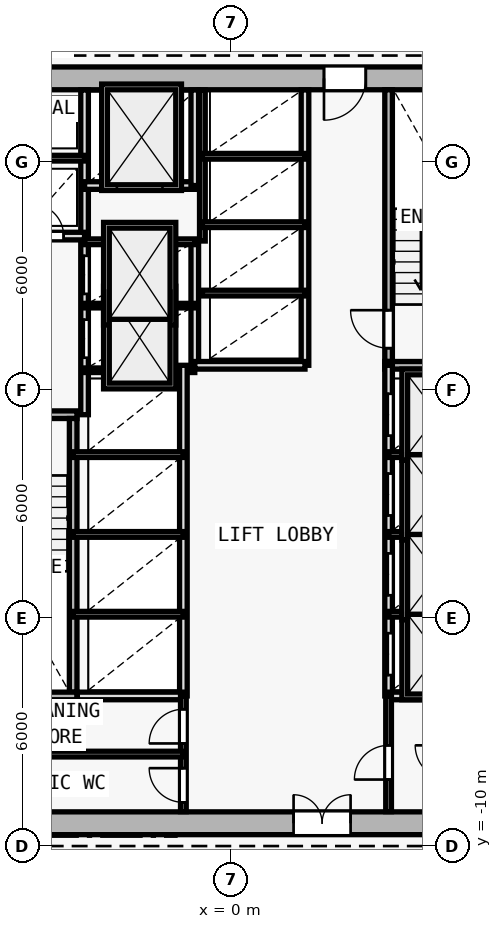
"""IFC4 building model, lengths in metres.
Left out: names, types, materials, properties, quantities, classifications, styles, units other than length and angle.
Written with IfcOpenShell. Run it as: python <this file> out.ifc"""

import sys

from ifc_helpers import new_model, si_unit, direction, frame, frame_2d, origin, origin_2d, place, context, subcontext, project, spatial, rectangle, i_section, extrude, element, fill, save


model = new_model("IFC4")
c1 = context("Model", 3, precision=1e-05, world=origin(), true_north=direction((0.0, 1.0)))
c2 = subcontext(c1, "Body", "Model", "MODEL_VIEW")
j1 = project(units=[si_unit("LENGTHUNIT", "METRE"), si_unit("PLANEANGLEUNIT", "RADIAN")], contexts=[c1])
p1 = place(None, origin())
s1 = spatial("IfcSite", under=j1, at=p1, CompositionType="ELEMENT")
p2 = place(p1, origin())
s2 = spatial("IfcBuilding", under=s1, at=p2, CompositionType="ELEMENT")
p3 = place(p2, frame((0.0, 0.0, 66.0)))
s3 = spatial("IfcBuildingStorey", under=s2, at=p3, CompositionType="ELEMENT", Elevation=66.0)
p4 = place(p3, frame((0.0, -9.4, 0.0), z_axis=(0.0, 0.0, 1.0), x_axis=(1.0, 0.0, 0.0)))
e1 = element("IfcColumn", 1, at=p4, inside=s3, PredefinedType="COLUMN", context=c2, shape_type="SweptSolid", body=[
    extrude(i_section(OverallWidth=0.416, OverallDepth=0.446, WebThickness=0.025, FlangeThickness=0.04, FilletRadius=0.015, at=origin_2d()), origin(), (0.0, 0.0, 1.0), 3.6),
])
p5 = place(p3, frame((-8.0, -9.4, 0.0), z_axis=(0.0, 0.0, 1.0), x_axis=(1.0, 0.0, 0.0)))
e2 = element("IfcWall", 2, at=p5, inside=s3, PredefinedType="SHEAR", context=c2, shape_type="SweptSolid", body=[
    extrude(rectangle(XDim=16.0, YDim=0.6, at=frame_2d((8.0, 0.0))), origin(), (0.0, 0.0, 1.0), 3.35),
])
p6 = place(p5, frame((9.65, 0.0, 0.0)))
e3 = element("IfcOpeningElement", 3, at=p6, cuts=e2, PredefinedType="OPENING", context=c2, shape_type="SweptSolid", body=[
    extrude(rectangle(XDim=1.5, YDim=2.2, at=frame_2d((0.75, 1.1))), frame((0.0, 0.31, 0.0), z_axis=(0.0, -1.0, 0.0), x_axis=(1.0, 0.0, 0.0)), (0.0, 0.0, 1.0), 0.62),
])
p7 = place(p3, frame((8.0, 10.2, 0.0), z_axis=(0.0, 0.0, 1.0), x_axis=(-1.0, 0.0, 0.0)))
e4 = element("IfcWall", 4, at=p7, inside=s3, PredefinedType="SHEAR", context=c2, shape_type="SweptSolid", body=[
    extrude(rectangle(XDim=16.0, YDim=0.6, at=frame_2d((8.0, 0.0))), origin(), (0.0, 0.0, 1.0), 3.35),
])
p8 = place(p7, frame((4.45, 0.0, 0.0)))
e5 = element("IfcOpeningElement", 5, at=p8, cuts=e4, PredefinedType="OPENING", context=c2, shape_type="SweptSolid", body=[
    extrude(rectangle(XDim=1.1, YDim=2.15, at=frame_2d((0.55, 1.075))), frame((0.0, 0.31, 0.0), z_axis=(0.0, -1.0, 0.0), x_axis=(1.0, 0.0, 0.0)), (0.0, 0.0, 1.0), 0.62),
])
p9 = place(p3, frame((-7.4, 1.35, 0.0), z_axis=(0.0, 0.0, 1.0), x_axis=(1.0, 0.0, 0.0)))
e6 = element("IfcWall", 6, at=p9, inside=s3, PredefinedType="SOLIDWALL", context=c2, shape_type="SweptSolid", body=[
    extrude(rectangle(XDim=3.35, YDim=0.2, at=frame_2d((1.675, 0.0))), origin(), (0.0, 0.0, 1.0), 3.35),
])
p10 = place(p9, frame((0.65, 0.0, 0.0)))
e7 = element("IfcOpeningElement", 7, at=p10, cuts=e6, PredefinedType="OPENING", context=c2, shape_type="SweptSolid", body=[
    extrude(rectangle(XDim=1.0, YDim=2.15, at=frame_2d((0.5, 1.075))), frame((0.0, 0.11, 0.0), z_axis=(0.0, -1.0, 0.0), x_axis=(1.0, 0.0, 0.0)), (0.0, 0.0, 1.0), 0.22),
])
p11 = place(p3, frame((-4.15, -5.95, 0.0), z_axis=(0.0, 0.0, 1.0), x_axis=(0.0, 1.0, 0.0)))
e8 = element("IfcWall", 8, at=p11, inside=s3, PredefinedType="SOLIDWALL", context=c2, shape_type="SweptSolid", body=[
    extrude(rectangle(XDim=7.2, YDim=0.2, at=frame_2d((3.6, 0.0))), origin(), (0.0, 0.0, 1.0), 3.35),
])
p12 = place(p3, frame((-3.85, 1.35, 0.0), z_axis=(0.0, 0.0, 1.0), x_axis=(0.0, 1.0, 0.0)))
e9 = element("IfcWall", 9, at=p12, inside=s3, PredefinedType="SOLIDWALL", context=c2, shape_type="SweptSolid", body=[
    extrude(rectangle(XDim=8.545, YDim=0.2, at=frame_2d((4.272, 0.0))), origin(), (0.0, 0.0, 1.0), 3.35),
])
p13 = place(p12, frame((1.5, 0.0, 0.0)))
e10 = element("IfcOpeningElement", 10, at=p13, cuts=e9, PredefinedType="OPENING", context=c2, shape_type="SweptSolid", body=[
    extrude(rectangle(XDim=1.0, YDim=2.15, at=frame_2d((0.5, 1.075))), frame((0.0, 0.11, 0.0), z_axis=(0.0, -1.0, 0.0), x_axis=(1.0, 0.0, 0.0)), (0.0, 0.0, 1.0), 0.22),
])
p14 = place(p12, frame((3.18, 0.0, 0.0)))
e11 = element("IfcOpeningElement", 11, at=p14, cuts=e9, PredefinedType="OPENING", context=c2, shape_type="SweptSolid", body=[
    extrude(rectangle(XDim=1.0, YDim=2.15, at=frame_2d((0.5, 1.075))), frame((0.0, 0.11, 0.0), z_axis=(0.0, -1.0, 0.0), x_axis=(1.0, 0.0, 0.0)), (0.0, 0.0, 1.0), 0.22),
])
p15 = place(p3, frame((-7.395, 6.05, 0.0), z_axis=(0.0, 0.0, 1.0), x_axis=(1.0, 0.0, 0.0)))
e12 = element("IfcWall", 12, at=p15, inside=s3, PredefinedType="SOLIDWALL", context=c2, shape_type="SweptSolid", body=[
    extrude(rectangle(XDim=3.545, YDim=0.2, at=frame_2d((1.772, 0.0))), origin(), (0.0, 0.0, 1.0), 3.35),
])
p16 = place(p15, frame((0.345, 0.0, 0.0)))
e13 = element("IfcOpeningElement", 13, at=p16, cuts=e12, PredefinedType="OPENING", context=c2, shape_type="SweptSolid", body=[
    extrude(rectangle(XDim=0.85, YDim=2.1, at=frame_2d((0.425, 1.05))), frame((0.0, 0.11, 0.0), z_axis=(0.0, -1.0, 0.0), x_axis=(1.0, 0.0, 0.0)), (0.0, 0.0, 1.0), 0.22),
])
p17 = place(p15, frame((2.145, 0.0, 0.0)))
e14 = element("IfcOpeningElement", 14, at=p17, cuts=e12, PredefinedType="OPENING", context=c2, shape_type="SweptSolid", body=[
    extrude(rectangle(XDim=0.85, YDim=2.1, at=frame_2d((0.425, 1.05))), frame((0.0, 0.11, 0.0), z_axis=(0.0, -1.0, 0.0), x_axis=(1.0, 0.0, 0.0)), (0.0, 0.0, 1.0), 0.22),
])
p18 = place(p3, frame((-7.395, 8.1, 0.0), z_axis=(0.0, 0.0, 1.0), x_axis=(1.0, 0.0, 0.0)))
e15 = element("IfcWall", 15, at=p18, inside=s3, PredefinedType="PARTITIONING", context=c2, shape_type="SweptSolid", body=[
    extrude(rectangle(XDim=3.545, YDim=0.15, at=frame_2d((1.772, 0.0))), origin(), (0.0, 0.0, 1.0), 3.35),
])
p19 = place(p3, frame((4.15, 2.75, 0.0), z_axis=(0.0, 0.0, 1.0), x_axis=(0.0, 1.0, 0.0)))
e16 = element("IfcWall", 16, at=p19, inside=s3, PredefinedType="SOLIDWALL", context=c2, shape_type="SweptSolid", body=[
    extrude(rectangle(XDim=7.15, YDim=0.2, at=frame_2d((3.575, 0.0))), origin(), (0.0, 0.0, 1.0), 3.35),
])
p20 = place(p19, frame((0.35, 0.0, 0.0)))
e17 = element("IfcOpeningElement", 17, at=p20, cuts=e16, PredefinedType="OPENING", context=c2, shape_type="SweptSolid", body=[
    extrude(rectangle(XDim=1.0, YDim=2.15, at=frame_2d((0.5, 1.075))), frame((0.0, 0.11, 0.0), z_axis=(0.0, -1.0, 0.0), x_axis=(1.0, 0.0, 0.0)), (0.0, 0.0, 1.0), 0.22),
])
p21 = place(p3, frame((4.05, 2.65, 0.0), z_axis=(0.0, 0.0, 1.0), x_axis=(1.0, 0.0, 0.0)))
e18 = element("IfcWall", 18, at=p21, inside=s3, PredefinedType="SOLIDWALL", context=c2, shape_type="SweptSolid", body=[
    extrude(rectangle(XDim=3.35, YDim=0.2, at=frame_2d((1.675, 0.0))), origin(), (0.0, 0.0, 1.0), 3.35),
])
p22 = place(p3, frame((-0.95, 2.65, 0.0), z_axis=(0.0, 0.0, 1.0), x_axis=(0.0, 1.0, 0.0)))
e19 = element("IfcWall", 19, at=p22, inside=s3, PredefinedType="SOLIDWALL", context=c2, shape_type="SweptSolid", body=[
    extrude(rectangle(XDim=3.27, YDim=0.2, at=frame_2d((1.635, 0.0))), origin(), (0.0, 0.0, 1.0), 3.35),
])
for number, where, z_axis, x_axis in (
    (20, (-3.85, 2.52, 0.0), (0.0, 0.0, 1.0), (1.0, 0.0, 0.0)),
    (21, (-3.85, 4.22, 0.0), (0.0, 0.0, 1.0), (1.0, 0.0, 0.0)),
):
    element("IfcWall", number, at=place(p3, frame(where, z_axis=z_axis, x_axis=x_axis)), inside=s3, PredefinedType="PARTITIONING", context=c2, shape_type="SweptSolid", body=[
        extrude(rectangle(XDim=2.9, YDim=0.12, at=frame_2d((1.45, 0.0))), origin(), (0.0, 0.0, 1.0), 3.35),
    ])
p23 = place(p3, frame((-3.85, 5.9, 0.0), z_axis=(0.0, 0.0, 1.0), x_axis=(1.0, 0.0, 0.0)))
e22 = element("IfcWall", 22, at=p23, inside=s3, PredefinedType="PARTITIONING", context=c2, shape_type="SweptSolid", body=[
    extrude(rectangle(XDim=2.9, YDim=0.15, at=frame_2d((1.45, 0.0))), origin(), (0.0, 0.0, 1.0), 3.35),
])
p24 = place(p3, frame((-3.85, 7.38, 0.0), z_axis=(0.0, 0.0, 1.0), x_axis=(1.0, 0.0, 0.0)))
e23 = element("IfcWall", 23, at=p24, inside=s3, PredefinedType="SOLIDWALL", context=c2, shape_type="SweptSolid", body=[
    extrude(rectangle(XDim=2.9, YDim=0.2, at=frame_2d((1.45, 0.0))), origin(), (0.0, 0.0, 1.0), 3.35),
])
p25 = place(p24, frame((0.85, 0.0, 0.0)))
e24 = element("IfcOpeningElement", 24, at=p25, cuts=e23, PredefinedType="OPENING", context=c2, shape_type="SweptSolid", body=[
    extrude(rectangle(XDim=1.2, YDim=2.2, at=frame_2d((0.6, 1.1))), frame((0.0, 0.11, 0.0), z_axis=(0.0, -1.0, 0.0), x_axis=(1.0, 0.0, 0.0)), (0.0, 0.0, 1.0), 0.22),
])
p26 = place(p3, frame((-0.95, 7.38, 0.0), z_axis=(0.0, 0.0, 1.0), x_axis=(0.0, 1.0, 0.0)))
e25 = element("IfcWall", 25, at=p26, inside=s3, PredefinedType="SOLIDWALL", context=c2, shape_type="SweptSolid", body=[
    extrude(rectangle(XDim=2.515, YDim=0.2, at=frame_2d((1.258, 0.0))), origin(), (0.0, 0.0, 1.0), 3.35),
])
p27 = place(p3, frame((4.15, -6.05, 0.0), z_axis=(0.0, 0.0, 1.0), x_axis=(0.0, 1.0, 0.0)))
e26 = element("IfcWall", 26, at=p27, inside=s3, PredefinedType="SOLIDWALL", context=c2, shape_type="SweptSolid", body=[
    extrude(rectangle(XDim=8.7, YDim=0.2, at=frame_2d((4.35, 0.0))), origin(), (0.0, 0.0, 1.0), 3.35),
])
p28 = place(p27, frame((0.55, 0.0, 0.0)))
e27 = element("IfcOpeningElement", 27, at=p28, cuts=e26, PredefinedType="OPENING", context=c2, shape_type="SweptSolid", body=[
    extrude(rectangle(XDim=1.1, YDim=2.15, at=frame_2d((0.55, 1.075))), frame((0.0, 0.11, 0.0), z_axis=(0.0, -1.0, 0.0), x_axis=(1.0, 0.0, 0.0)), (0.0, 0.0, 1.0), 0.22),
])
p29 = place(p27, frame((2.65, 0.0, 0.0)))
e28 = element("IfcOpeningElement", 28, at=p29, cuts=e26, PredefinedType="OPENING", context=c2, shape_type="SweptSolid", body=[
    extrude(rectangle(XDim=1.1, YDim=2.15, at=frame_2d((0.55, 1.075))), frame((0.0, 0.11, 0.0), z_axis=(0.0, -1.0, 0.0), x_axis=(1.0, 0.0, 0.0)), (0.0, 0.0, 1.0), 0.22),
])
p30 = place(p27, frame((4.75, 0.0, 0.0)))
e29 = element("IfcOpeningElement", 29, at=p30, cuts=e26, PredefinedType="OPENING", context=c2, shape_type="SweptSolid", body=[
    extrude(rectangle(XDim=1.1, YDim=2.15, at=frame_2d((0.55, 1.075))), frame((0.0, 0.11, 0.0), z_axis=(0.0, -1.0, 0.0), x_axis=(1.0, 0.0, 0.0)), (0.0, 0.0, 1.0), 0.22),
])
p31 = place(p27, frame((6.85, 0.0, 0.0)))
e30 = element("IfcOpeningElement", 30, at=p31, cuts=e26, PredefinedType="OPENING", context=c2, shape_type="SweptSolid", body=[
    extrude(rectangle(XDim=1.1, YDim=2.15, at=frame_2d((0.55, 1.075))), frame((0.0, 0.11, 0.0), z_axis=(0.0, -1.0, 0.0), x_axis=(1.0, 0.0, 0.0)), (0.0, 0.0, 1.0), 0.22),
])
for number, where, z_axis, x_axis in (
    (31, (4.15, -3.9, 0.0), (0.0, 0.0, 1.0), (1.0, 0.0, 0.0)),
    (32, (4.15, -1.8, 0.0), (0.0, 0.0, 1.0), (1.0, 0.0, 0.0)),
    (33, (4.15, 0.3, 0.0), (0.0, 0.0, 1.0), (1.0, 0.0, 0.0)),
):
    element("IfcWall", number, at=place(p3, frame(where, z_axis=z_axis, x_axis=x_axis)), inside=s3, PredefinedType="PARTITIONING", context=c2, shape_type="SweptSolid", body=[
        extrude(rectangle(XDim=2.6, YDim=0.15, at=frame_2d((1.3, 0.0))), origin(), (0.0, 0.0, 1.0), 3.35),
    ])
p32 = place(p3, frame((-1.25, -6.05, 0.0), z_axis=(0.0, 0.0, 1.0), x_axis=(0.0, 1.0, 0.0)))
e34 = element("IfcWall", 34, at=p32, inside=s3, PredefinedType="SOLIDWALL", context=c2, shape_type="SweptSolid", body=[
    extrude(rectangle(XDim=8.7, YDim=0.2, at=frame_2d((4.35, 0.0))), origin(), (0.0, 0.0, 1.0), 3.35),
])
for number, where, z_axis, x_axis in (
    (35, (-4.15, -3.9, 0.0), (0.0, 0.0, 1.0), (1.0, 0.0, 0.0)),
    (36, (-4.15, -1.8, 0.0), (0.0, 0.0, 1.0), (1.0, 0.0, 0.0)),
    (37, (-4.15, 0.3, 0.0), (0.0, 0.0, 1.0), (1.0, 0.0, 0.0)),
):
    element("IfcWall", number, at=place(p3, frame(where, z_axis=z_axis, x_axis=x_axis)), inside=s3, PredefinedType="PARTITIONING", context=c2, shape_type="SweptSolid", body=[
        extrude(rectangle(XDim=2.9, YDim=0.15, at=frame_2d((1.45, 0.0))), origin(), (0.0, 0.0, 1.0), 3.35),
    ])
p33 = place(p3, frame((1.95, 2.65, 0.0), z_axis=(0.0, 0.0, 1.0), x_axis=(0.0, 1.0, 0.0)))
e38 = element("IfcWall", 38, at=p33, inside=s3, PredefinedType="SOLIDWALL", context=c2, shape_type="SweptSolid", body=[
    extrude(rectangle(XDim=7.245, YDim=0.2, at=frame_2d((3.623, 0.0))), origin(), (0.0, 0.0, 1.0), 3.35),
])
p34 = place(p3, frame((-0.95, 2.65, 0.0), z_axis=(0.0, 0.0, 1.0), x_axis=(1.0, 0.0, 0.0)))
e39 = element("IfcWall", 39, at=p34, inside=s3, PredefinedType="SOLIDWALL", context=c2, shape_type="SweptSolid", body=[
    extrude(rectangle(XDim=2.9, YDim=0.2, at=frame_2d((1.45, 0.0))), origin(), (0.0, 0.0, 1.0), 3.35),
])
p35 = place(p3, frame((-0.75, 5.92, 0.0), z_axis=(0.0, 0.0, 1.0), x_axis=(0.0, 1.0, 0.0)))
e40 = element("IfcWall", 40, at=p35, inside=s3, PredefinedType="PARTITIONING", context=c2, shape_type="SweptSolid", body=[
    extrude(rectangle(XDim=3.975, YDim=0.15, at=frame_2d((1.988, 0.0))), origin(), (0.0, 0.0, 1.0), 3.35),
])
for number, where, z_axis, x_axis in (
    (41, (-0.75, 4.55, 0.0), (0.0, 0.0, 1.0), (1.0, 0.0, 0.0)),
    (42, (-0.75, 6.35, 0.0), (0.0, 0.0, 1.0), (1.0, 0.0, 0.0)),
    (43, (-0.75, 8.15, 0.0), (0.0, 0.0, 1.0), (1.0, 0.0, 0.0)),
):
    element("IfcWall", number, at=place(p3, frame(where, z_axis=z_axis, x_axis=x_axis)), inside=s3, PredefinedType="PARTITIONING", context=c2, shape_type="SweptSolid", body=[
        extrude(rectangle(XDim=2.7, YDim=0.15, at=frame_2d((1.35, 0.0))), origin(), (0.0, 0.0, 1.0), 3.35),
    ])
p36 = place(p3, frame((-7.4, -6.05, 0.0), z_axis=(0.0, 0.0, 1.0), x_axis=(1.0, 0.0, 0.0)))
e44 = element("IfcWall", 44, at=p36, inside=s3, PredefinedType="SOLIDWALL", context=c2, shape_type="SweptSolid", body=[
    extrude(rectangle(XDim=3.35, YDim=0.2, at=frame_2d((1.675, 0.0))), origin(), (0.0, 0.0, 1.0), 3.35),
])
p37 = place(p3, frame((-4.04, -6.05, 0.0), z_axis=(0.0, 0.0, 1.0), x_axis=(1.0, 0.0, 0.0)))
e45 = element("IfcWall", 45, at=p37, inside=s3, PredefinedType="SOLIDWALL", context=c2, shape_type="SweptSolid", body=[
    extrude(rectangle(XDim=2.79, YDim=0.2, at=frame_2d((1.395, 0.0))), origin(), (0.0, 0.0, 1.0), 3.35),
])
p38 = place(p3, frame((4.15, -6.05, 0.0), z_axis=(0.0, 0.0, 1.0), x_axis=(1.0, 0.0, 0.0)))
e46 = element("IfcWall", 46, at=p38, inside=s3, PredefinedType="SOLIDWALL", context=c2, shape_type="SweptSolid", body=[
    extrude(rectangle(XDim=3.245, YDim=0.2, at=frame_2d((1.623, 0.0))), origin(), (0.0, 0.0, 1.0), 3.35),
])
p39 = place(p3, frame((-1.25, -9.095, 0.0), z_axis=(0.0, 0.0, 1.0), x_axis=(0.0, 1.0, 0.0)))
e47 = element("IfcWall", 47, at=p39, inside=s3, PredefinedType="PARTITIONING", context=c2, shape_type="SweptSolid", body=[
    extrude(rectangle(XDim=3.045, YDim=0.15, at=frame_2d((1.522, 0.0))), origin(), (0.0, 0.0, 1.0), 3.35),
])
p40 = place(p39, frame((1.795, 0.0, 0.0)))
e48 = element("IfcOpeningElement", 48, at=p40, cuts=e47, PredefinedType="OPENING", context=c2, shape_type="SweptSolid", body=[
    extrude(rectangle(XDim=0.9, YDim=2.1, at=frame_2d((0.45, 1.05))), frame((0.0, 0.085, 0.0), z_axis=(0.0, -1.0, 0.0), x_axis=(1.0, 0.0, 0.0)), (0.0, 0.0, 1.0), 0.17),
])
p41 = place(p39, frame((0.245, 0.0, 0.0)))
e49 = element("IfcOpeningElement", 49, at=p41, cuts=e47, PredefinedType="OPENING", context=c2, shape_type="SweptSolid", body=[
    extrude(rectangle(XDim=0.9, YDim=2.1, at=frame_2d((0.45, 1.05))), frame((0.0, 0.085, 0.0), z_axis=(0.0, -1.0, 0.0), x_axis=(1.0, 0.0, 0.0)), (0.0, 0.0, 1.0), 0.17),
])
p42 = place(p3, frame((4.15, -9.095, 0.0), z_axis=(0.0, 0.0, 1.0), x_axis=(0.0, 1.0, 0.0)))
e50 = element("IfcWall", 50, at=p42, inside=s3, PredefinedType="PARTITIONING", context=c2, shape_type="SweptSolid", body=[
    extrude(rectangle(XDim=3.045, YDim=0.15, at=frame_2d((1.522, 0.0))), origin(), (0.0, 0.0, 1.0), 3.35),
])
p43 = place(p42, frame((0.845, 0.0, 0.0)))
e51 = element("IfcOpeningElement", 51, at=p43, cuts=e50, PredefinedType="OPENING", context=c2, shape_type="SweptSolid", body=[
    extrude(rectangle(XDim=0.9, YDim=2.1, at=frame_2d((0.45, 1.05))), frame((0.0, 0.085, 0.0), z_axis=(0.0, -1.0, 0.0), x_axis=(1.0, 0.0, 0.0)), (0.0, 0.0, 1.0), 0.17),
])
p44 = place(p3, frame((-7.395, -7.58, 0.0), z_axis=(0.0, 0.0, 1.0), x_axis=(1.0, 0.0, 0.0)))
e52 = element("IfcWall", 52, at=p44, inside=s3, PredefinedType="PARTITIONING", context=c2, shape_type="SweptSolid", body=[
    extrude(rectangle(XDim=6.145, YDim=0.15, at=frame_2d((3.073, 0.0))), origin(), (0.0, 0.0, 1.0), 3.35),
])
p45 = place(p6, origin())
e53 = element("IfcDoor", 53, at=p45, inside=s3, OperationType="DOUBLE_DOOR_SINGLE_SWING", PredefinedType="DOOR", context=c2, shape_type="SweptSolid", body=[
    extrude(rectangle(XDim=1.5, YDim=2.2, at=frame_2d((0.75, 1.1))), frame((0.0, 0.025, 0.0), z_axis=(0.0, -1.0, 0.0), x_axis=(1.0, 0.0, 0.0)), (0.0, 0.0, 1.0), 0.05),
])
fill(e3, e53)
p46 = place(p8, origin())
e54 = element("IfcDoor", 54, at=p46, inside=s3, OperationType="SINGLE_SWING_RIGHT", PredefinedType="DOOR", context=c2, shape_type="SweptSolid", body=[
    extrude(rectangle(XDim=1.1, YDim=2.15, at=frame_2d((0.55, 1.075))), frame((0.0, 0.025, 0.0), z_axis=(0.0, -1.0, 0.0), x_axis=(1.0, 0.0, 0.0)), (0.0, 0.0, 1.0), 0.05),
])
fill(e5, e54)
p47 = place(p17, origin())
e55 = element("IfcDoor", 55, at=p47, inside=s3, OperationType="SINGLE_SWING_LEFT", PredefinedType="DOOR", context=c2, shape_type="SweptSolid", body=[
    extrude(rectangle(XDim=0.85, YDim=2.1, at=frame_2d((0.425, 1.05))), frame((0.0, 0.025, 0.0), z_axis=(0.0, -1.0, 0.0), x_axis=(1.0, 0.0, 0.0)), (0.0, 0.0, 1.0), 0.05),
])
fill(e14, e55)
p48 = place(p20, origin())
e56 = element("IfcDoor", 56, at=p48, inside=s3, OperationType="SINGLE_SWING_RIGHT", PredefinedType="DOOR", context=c2, shape_type="SweptSolid", body=[
    extrude(rectangle(XDim=1.0, YDim=2.15, at=frame_2d((0.5, 1.075))), frame((0.0, 0.025, 0.0), z_axis=(0.0, -1.0, 0.0), x_axis=(1.0, 0.0, 0.0)), (0.0, 0.0, 1.0), 0.05),
])
fill(e17, e56)
p49 = place(p25, origin())
e57 = element("IfcDoor", 57, at=p49, inside=s3, OperationType="DOUBLE_DOOR_SLIDING", PredefinedType="DOOR", context=c2, shape_type="SweptSolid", body=[
    extrude(rectangle(XDim=1.2, YDim=2.2, at=frame_2d((0.6, 1.1))), frame((0.0, 0.025, 0.0), z_axis=(0.0, -1.0, 0.0), x_axis=(1.0, 0.0, 0.0)), (0.0, 0.0, 1.0), 0.05),
])
fill(e24, e57)
p50 = place(p28, origin())
e58 = element("IfcDoor", 58, at=p50, inside=s3, OperationType="DOUBLE_DOOR_SLIDING", PredefinedType="DOOR", context=c2, shape_type="SweptSolid", body=[
    extrude(rectangle(XDim=1.1, YDim=2.15, at=frame_2d((0.55, 1.075))), frame((0.0, 0.025, 0.0), z_axis=(0.0, -1.0, 0.0), x_axis=(1.0, 0.0, 0.0)), (0.0, 0.0, 1.0), 0.05),
])
fill(e27, e58)
p51 = place(p29, origin())
e59 = element("IfcDoor", 59, at=p51, inside=s3, OperationType="DOUBLE_DOOR_SLIDING", PredefinedType="DOOR", context=c2, shape_type="SweptSolid", body=[
    extrude(rectangle(XDim=1.1, YDim=2.15, at=frame_2d((0.55, 1.075))), frame((0.0, 0.025, 0.0), z_axis=(0.0, -1.0, 0.0), x_axis=(1.0, 0.0, 0.0)), (0.0, 0.0, 1.0), 0.05),
])
fill(e28, e59)
p52 = place(p30, origin())
e60 = element("IfcDoor", 60, at=p52, inside=s3, OperationType="DOUBLE_DOOR_SLIDING", PredefinedType="DOOR", context=c2, shape_type="SweptSolid", body=[
    extrude(rectangle(XDim=1.1, YDim=2.15, at=frame_2d((0.55, 1.075))), frame((0.0, 0.025, 0.0), z_axis=(0.0, -1.0, 0.0), x_axis=(1.0, 0.0, 0.0)), (0.0, 0.0, 1.0), 0.05),
])
fill(e29, e60)
p53 = place(p31, origin())
e61 = element("IfcDoor", 61, at=p53, inside=s3, OperationType="DOUBLE_DOOR_SLIDING", PredefinedType="DOOR", context=c2, shape_type="SweptSolid", body=[
    extrude(rectangle(XDim=1.1, YDim=2.15, at=frame_2d((0.55, 1.075))), frame((0.0, 0.025, 0.0), z_axis=(0.0, -1.0, 0.0), x_axis=(1.0, 0.0, 0.0)), (0.0, 0.0, 1.0), 0.05),
])
fill(e30, e61)
p54 = place(p13, origin())
e62 = element("IfcDoor", 62, at=p54, inside=s3, OperationType="DOUBLE_DOOR_SLIDING", PredefinedType="DOOR", context=c2, shape_type="SweptSolid", body=[
    extrude(rectangle(XDim=1.0, YDim=2.15, at=frame_2d((0.5, 1.075))), frame((0.0, 0.025, 0.0), z_axis=(0.0, -1.0, 0.0), x_axis=(1.0, 0.0, 0.0)), (0.0, 0.0, 1.0), 0.05),
])
fill(e10, e62)
p55 = place(p14, origin())
e63 = element("IfcDoor", 63, at=p55, inside=s3, OperationType="DOUBLE_DOOR_SLIDING", PredefinedType="DOOR", context=c2, shape_type="SweptSolid", body=[
    extrude(rectangle(XDim=1.0, YDim=2.15, at=frame_2d((0.5, 1.075))), frame((0.0, 0.025, 0.0), z_axis=(0.0, -1.0, 0.0), x_axis=(1.0, 0.0, 0.0)), (0.0, 0.0, 1.0), 0.05),
])
fill(e11, e63)
p56 = place(p40, origin())
e64 = element("IfcDoor", 64, at=p56, inside=s3, OperationType="SINGLE_SWING_LEFT", PredefinedType="DOOR", context=c2, shape_type="SweptSolid", body=[
    extrude(rectangle(XDim=0.9, YDim=2.1, at=frame_2d((0.45, 1.05))), frame((0.0, 0.025, 0.0), z_axis=(0.0, -1.0, 0.0), x_axis=(1.0, 0.0, 0.0)), (0.0, 0.0, 1.0), 0.05),
])
fill(e48, e64)
p57 = place(p41, origin())
e65 = element("IfcDoor", 65, at=p57, inside=s3, OperationType="SINGLE_SWING_RIGHT", PredefinedType="DOOR", context=c2, shape_type="SweptSolid", body=[
    extrude(rectangle(XDim=0.9, YDim=2.1, at=frame_2d((0.45, 1.05))), frame((0.0, 0.025, 0.0), z_axis=(0.0, -1.0, 0.0), x_axis=(1.0, 0.0, 0.0)), (0.0, 0.0, 1.0), 0.05),
])
fill(e49, e65)
p58 = place(p43, origin())
e66 = element("IfcDoor", 66, at=p58, inside=s3, OperationType="SINGLE_SWING_LEFT", PredefinedType="DOOR", context=c2, shape_type="SweptSolid", body=[
    extrude(rectangle(XDim=0.9, YDim=2.1, at=frame_2d((0.45, 1.05))), frame((0.0, 0.025, 0.0), z_axis=(0.0, -1.0, 0.0), x_axis=(1.0, 0.0, 0.0)), (0.0, 0.0, 1.0), 0.05),
])
fill(e51, e66)
save(model, sys.argv[1])
